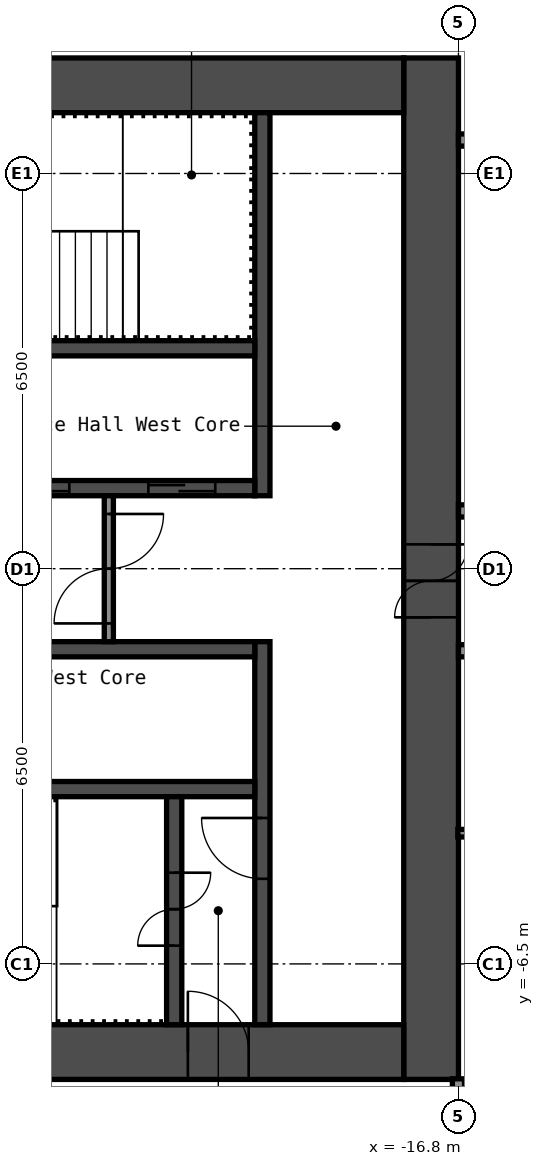
"""IFC4 building model, lengths in metres.
Left out: names, types, materials, properties, quantities, classifications, styles, units other than length and angle.
Written with IfcOpenShell. Run it as: python <this file> out.ifc"""

import sys

from ifc_helpers import new_model, si_unit, direction, frame, frame_2d, origin, place, context, subcontext, project, spatial, rectangle, extrude, element, fill, save


model = new_model("IFC4")
c1 = context("Model", 3, precision=1e-05, world=origin(), true_north=direction((0.0, 1.0)))
c2 = subcontext(c1, "Body", "Model", "MODEL_VIEW")
j1 = project(units=[si_unit("LENGTHUNIT", "METRE"), si_unit("PLANEANGLEUNIT", "RADIAN")], contexts=[c1])
p1 = place(None, origin())
s1 = spatial("IfcSite", under=j1, at=p1, CompositionType="ELEMENT")
p2 = place(p1, origin())
s2 = spatial("IfcBuilding", under=s1, at=p2, CompositionType="ELEMENT")
p3 = place(p2, frame((0.0, 0.0, 78.6)))
s3 = spatial("IfcBuildingStorey", under=s2, at=p3, CompositionType="ELEMENT", Elevation=78.6)
p4 = place(p3, frame((-17.25, -8.4, 0.0), z_axis=(0.0, 0.0, 1.0), x_axis=(0.0, 1.0, 0.0)))
e1 = element("IfcWall", 1, at=p4, inside=s3, PredefinedType="SHEAR", context=c2, shape_type="SweptSolid", body=[
    extrude(rectangle(XDim=16.8, YDim=0.9, at=frame_2d((8.4, 0.0))), origin(), (0.0, 0.0, 1.0), 2.8),
])
p5 = place(p4, frame((7.6, 0.0, 0.0)))
e2 = element("IfcOpeningElement", 2, at=p5, cuts=e1, PredefinedType="OPENING", context=c2, shape_type="SweptSolid", body=[
    extrude(rectangle(XDim=1.2, YDim=2.1, at=frame_2d((0.6, 1.05))), frame((0.0, 0.46, 0.0), z_axis=(0.0, -1.0, 0.0), x_axis=(1.0, 0.0, 0.0)), (0.0, 0.0, 1.0), 0.92),
])
p6 = place(p3, frame((-32.7, 7.95, 0.0), z_axis=(0.0, 0.0, 1.0), x_axis=(1.0, 0.0, 0.0)))
e3 = element("IfcWall", 3, at=p6, inside=s3, PredefinedType="SHEAR", context=c2, shape_type="SweptSolid", body=[
    extrude(rectangle(XDim=15.0, YDim=0.9, at=frame_2d((7.5, 0.0))), origin(), (0.0, 0.0, 1.0), 2.8),
])
p7 = place(p6, frame((3.4, 0.0, 0.0)))
e4 = element("IfcOpeningElement", 4, at=p7, cuts=e3, PredefinedType="OPENING", context=c2, shape_type="SweptSolid", body=[
    extrude(rectangle(XDim=1.2, YDim=2.1, at=frame_2d((0.6, 1.05))), frame((0.0, 0.46, 0.0), z_axis=(0.0, -1.0, 0.0), x_axis=(1.0, 0.0, 0.0)), (0.0, 0.0, 1.0), 0.92),
])
p8 = place(p6, frame((0.75, 0.0, 0.0)))
e5 = element("IfcOpeningElement", 5, at=p8, cuts=e3, PredefinedType="OPENING", context=c2, shape_type="SweptSolid", body=[
    extrude(rectangle(XDim=0.9, YDim=2.1, at=frame_2d((0.45, 1.05))), frame((0.0, 0.46, 0.0), z_axis=(0.0, -1.0, 0.0), x_axis=(1.0, 0.0, 0.0)), (0.0, 0.0, 1.0), 0.92),
])
p9 = place(p3, frame((-32.7, -7.95, 0.0), z_axis=(0.0, 0.0, 1.0), x_axis=(1.0, 0.0, 0.0)))
e6 = element("IfcWall", 6, at=p9, inside=s3, PredefinedType="SHEAR", context=c2, shape_type="SweptSolid", body=[
    extrude(rectangle(XDim=15.0, YDim=0.9, at=frame_2d((7.5, 0.0))), origin(), (0.0, 0.0, 1.0), 2.8),
])
p10 = place(p9, frame((11.45, 0.0, 0.0)))
e7 = element("IfcOpeningElement", 7, at=p10, cuts=e6, PredefinedType="OPENING", context=c2, shape_type="SweptSolid", body=[
    extrude(rectangle(XDim=1.0, YDim=2.1, at=frame_2d((0.5, 1.05))), frame((0.0, 0.46, 0.0), z_axis=(0.0, -1.0, 0.0), x_axis=(1.0, 0.0, 0.0)), (0.0, 0.0, 1.0), 0.92),
])
p11 = place(p3, frame((-20.025, 1.2, 0.0), z_axis=(0.0, 0.0, 1.0), x_axis=(0.0, 1.0, 0.0)))
e8 = element("IfcWall", 8, at=p11, inside=s3, PredefinedType="SHEAR", context=c2, shape_type="SweptSolid", body=[
    extrude(rectangle(XDim=6.3, YDim=0.25, at=frame_2d((3.15, 0.0))), origin(), (0.0, 0.0, 1.0), 2.8),
])
p12 = place(p3, frame((-20.025, -7.5, 0.0), z_axis=(0.0, 0.0, 1.0), x_axis=(0.0, 1.0, 0.0)))
e9 = element("IfcWall", 9, at=p12, inside=s3, PredefinedType="SHEAR", context=c2, shape_type="SweptSolid", body=[
    extrude(rectangle(XDim=6.3, YDim=0.25, at=frame_2d((3.15, 0.0))), origin(), (0.0, 0.0, 1.0), 2.8),
])
p13 = place(p12, frame((2.4, 0.0, 0.0)))
e10 = element("IfcOpeningElement", 10, at=p13, cuts=e9, PredefinedType="OPENING", context=c2, shape_type="SweptSolid", body=[
    extrude(rectangle(XDim=1.0, YDim=2.1, at=frame_2d((0.5, 1.05))), frame((0.0, 0.135, 0.0), z_axis=(0.0, -1.0, 0.0), x_axis=(1.0, 0.0, 0.0)), (0.0, 0.0, 1.0), 0.27),
])
p14 = place(p3, frame((-27.65, 1.325, 0.0), z_axis=(0.0, 0.0, 1.0), x_axis=(1.0, 0.0, 0.0)))
e11 = element("IfcWall", 11, at=p14, inside=s3, PredefinedType="SHEAR", context=c2, shape_type="SweptSolid", body=[
    extrude(rectangle(XDim=7.5, YDim=0.25, at=frame_2d((3.75, 0.0))), origin(), (0.0, 0.0, 1.0), 2.8),
])
p15 = place(p14, frame((5.75, 0.0, 0.0)))
e12 = element("IfcOpeningElement", 12, at=p15, cuts=e11, PredefinedType="OPENING", context=c2, shape_type="SweptSolid", body=[
    extrude(rectangle(XDim=1.1, YDim=2.1, at=frame_2d((0.55, 1.05))), frame((0.0, 0.135, 0.0), z_axis=(0.0, -1.0, 0.0), x_axis=(1.0, 0.0, 0.0)), (0.0, 0.0, 1.0), 0.27),
])
p16 = place(p14, frame((3.35, 0.0, 0.0)))
e13 = element("IfcOpeningElement", 13, at=p16, cuts=e11, PredefinedType="OPENING", context=c2, shape_type="SweptSolid", body=[
    extrude(rectangle(XDim=1.1, YDim=2.1, at=frame_2d((0.55, 1.05))), frame((0.0, 0.135, 0.0), z_axis=(0.0, -1.0, 0.0), x_axis=(1.0, 0.0, 0.0)), (0.0, 0.0, 1.0), 0.27),
])
p17 = place(p14, frame((0.95, 0.0, 0.0)))
e14 = element("IfcOpeningElement", 14, at=p17, cuts=e11, PredefinedType="OPENING", context=c2, shape_type="SweptSolid", body=[
    extrude(rectangle(XDim=1.1, YDim=2.1, at=frame_2d((0.55, 1.05))), frame((0.0, 0.135, 0.0), z_axis=(0.0, -1.0, 0.0), x_axis=(1.0, 0.0, 0.0)), (0.0, 0.0, 1.0), 0.27),
])
for number, where, z_axis, x_axis in (
    (15, (-27.65, 3.625, 0.0), (0.0, 0.0, 1.0), (1.0, 0.0, 0.0)),
    (16, (-27.65, -1.325, 0.0), (0.0, 0.0, 1.0), (1.0, 0.0, 0.0)),
    (17, (-27.65, -3.625, 0.0), (0.0, 0.0, 1.0), (1.0, 0.0, 0.0)),
):
    element("IfcWall", number, at=place(p3, frame(where, z_axis=z_axis, x_axis=x_axis)), inside=s3, PredefinedType="SHEAR", context=c2, shape_type="SweptSolid", body=[
        extrude(rectangle(XDim=7.5, YDim=0.25, at=frame_2d((3.75, 0.0))), origin(), (0.0, 0.0, 1.0), 2.8),
    ])
p18 = place(p3, frame((-21.475, -7.5, 0.0), z_axis=(0.0, 0.0, 1.0), x_axis=(0.0, 1.0, 0.0)))
e18 = element("IfcWall", 18, at=p18, inside=s3, PredefinedType="SHEAR", context=c2, shape_type="SweptSolid", body=[
    extrude(rectangle(XDim=3.75, YDim=0.25, at=frame_2d((1.875, 0.0))), origin(), (0.0, 0.0, 1.0), 2.8),
])
p19 = place(p18, frame((1.3, 0.0, 0.0)))
e19 = element("IfcOpeningElement", 19, at=p19, cuts=e18, PredefinedType="OPENING", context=c2, shape_type="SweptSolid", body=[
    extrude(rectangle(XDim=1.2, YDim=2.1, at=frame_2d((0.6, 1.05))), frame((0.0, 0.135, 0.0), z_axis=(0.0, -1.0, 0.0), x_axis=(1.0, 0.0, 0.0)), (0.0, 0.0, 1.0), 0.27),
])
p20 = place(p3, frame((-22.55, -1.2, 0.0), z_axis=(0.0, 0.0, 1.0), x_axis=(0.0, 1.0, 0.0)))
e20 = element("IfcWall", 20, at=p20, inside=s3, PredefinedType="PARTITIONING", context=c2, shape_type="SweptSolid", body=[
    extrude(rectangle(XDim=2.4, YDim=0.15, at=frame_2d((1.2, 0.0))), origin(), (0.0, 0.0, 1.0), 2.8),
])
p21 = place(p20, frame((0.3, 0.0, 0.0)))
e21 = element("IfcOpeningElement", 21, at=p21, cuts=e20, PredefinedType="OPENING", context=c2, shape_type="SweptSolid", body=[
    extrude(rectangle(XDim=1.8, YDim=2.1, at=frame_2d((0.9, 1.05))), frame((0.0, 0.085, 0.0), z_axis=(0.0, -1.0, 0.0), x_axis=(1.0, 0.0, 0.0)), (0.0, 0.0, 1.0), 0.17),
])
p22 = place(p3, frame((-16.81, -4.35, 0.0), z_axis=(0.0, 0.0, 1.0), x_axis=(1.0, 0.0, 0.0)))
e22 = element("IfcWall", 22, at=p22, inside=s3, PredefinedType="PARTITIONING", context=c2, shape_type="SweptSolid", body=[
    extrude(rectangle(XDim=2.448, YDim=0.125, at=frame_2d((1.224, 0.0))), origin(), (0.0, 0.0, 1.0), 2.8),
])
p23 = place(p3, frame((-16.8, -1.35, 0.0), z_axis=(0.0, 0.0, 1.0), x_axis=(1.0, 0.0, 0.0)))
e23 = element("IfcWall", 23, at=p23, inside=s3, PredefinedType="PARTITIONING", context=c2, shape_type="SweptSolid", body=[
    extrude(rectangle(XDim=33.6, YDim=0.2, at=frame_2d((16.8, 0.0))), origin(), (0.0, 0.0, 1.0), 2.8),
])
p24 = place(p23, frame((2.85, 0.0, 0.0)))
e24 = element("IfcOpeningElement", 24, at=p24, cuts=e23, PredefinedType="OPENING", context=c2, shape_type="SweptSolid", body=[
    extrude(rectangle(XDim=1.0, YDim=2.1, at=frame_2d((0.5, 1.05))), frame((0.0, 0.11, 0.0), z_axis=(0.0, -1.0, 0.0), x_axis=(1.0, 0.0, 0.0)), (0.0, 0.0, 1.0), 0.22),
])
p25 = place(p23, frame((4.55, 0.0, 0.0)))
e25 = element("IfcOpeningElement", 25, at=p25, cuts=e23, PredefinedType="OPENING", context=c2, shape_type="SweptSolid", body=[
    extrude(rectangle(XDim=1.0, YDim=2.1, at=frame_2d((0.5, 1.05))), frame((0.0, 0.11, 0.0), z_axis=(0.0, -1.0, 0.0), x_axis=(1.0, 0.0, 0.0)), (0.0, 0.0, 1.0), 0.22),
])
p26 = place(p23, frame((13.9, 0.0, 0.0)))
e26 = element("IfcOpeningElement", 26, at=p26, cuts=e23, PredefinedType="OPENING", context=c2, shape_type="SweptSolid", body=[
    extrude(rectangle(XDim=1.0, YDim=2.1, at=frame_2d((0.5, 1.05))), frame((0.0, 0.11, 0.0), z_axis=(0.0, -1.0, 0.0), x_axis=(1.0, 0.0, 0.0)), (0.0, 0.0, 1.0), 0.22),
])
p27 = place(p23, frame((20.5, 0.0, 0.0)))
e27 = element("IfcOpeningElement", 27, at=p27, cuts=e23, PredefinedType="OPENING", context=c2, shape_type="SweptSolid", body=[
    extrude(rectangle(XDim=1.0, YDim=2.1, at=frame_2d((0.5, 1.05))), frame((0.0, 0.11, 0.0), z_axis=(0.0, -1.0, 0.0), x_axis=(1.0, 0.0, 0.0)), (0.0, 0.0, 1.0), 0.22),
])
p28 = place(p23, frame((28.05, 0.0, 0.0)))
e28 = element("IfcOpeningElement", 28, at=p28, cuts=e23, PredefinedType="OPENING", context=c2, shape_type="SweptSolid", body=[
    extrude(rectangle(XDim=1.0, YDim=2.1, at=frame_2d((0.5, 1.05))), frame((0.0, 0.11, 0.0), z_axis=(0.0, -1.0, 0.0), x_axis=(1.0, 0.0, 0.0)), (0.0, 0.0, 1.0), 0.22),
])
p29 = place(p23, frame((29.75, 0.0, 0.0)))
e29 = element("IfcOpeningElement", 29, at=p29, cuts=e23, PredefinedType="OPENING", context=c2, shape_type="SweptSolid", body=[
    extrude(rectangle(XDim=1.0, YDim=2.1, at=frame_2d((0.5, 1.05))), frame((0.0, 0.11, 0.0), z_axis=(0.0, -1.0, 0.0), x_axis=(1.0, 0.0, 0.0)), (0.0, 0.0, 1.0), 0.22),
])
p30 = place(p3, frame((-16.8, 0.95, 0.0), z_axis=(0.0, 0.0, 1.0), x_axis=(1.0, 0.0, 0.0)))
e30 = element("IfcWall", 30, at=p30, inside=s3, PredefinedType="PARTITIONING", context=c2, shape_type="SweptSolid", body=[
    extrude(rectangle(XDim=33.6, YDim=0.2, at=frame_2d((16.8, 0.0))), origin(), (0.0, 0.0, 1.0), 2.8),
])
p31 = place(p30, frame((9.88, 0.0, 0.0)))
e31 = element("IfcOpeningElement", 31, at=p31, cuts=e30, PredefinedType="OPENING", context=c2, shape_type="SweptSolid", body=[
    extrude(rectangle(XDim=0.9, YDim=2.1, at=frame_2d((0.45, 1.05))), frame((0.0, 0.11, 0.0), z_axis=(0.0, -1.0, 0.0), x_axis=(1.0, 0.0, 0.0)), (0.0, 0.0, 1.0), 0.22),
])
p32 = place(p30, frame((14.08, 0.0, 0.0)))
e32 = element("IfcOpeningElement", 32, at=p32, cuts=e30, PredefinedType="OPENING", context=c2, shape_type="SweptSolid", body=[
    extrude(rectangle(XDim=0.9, YDim=2.1, at=frame_2d((0.45, 1.05))), frame((0.0, 0.11, 0.0), z_axis=(0.0, -1.0, 0.0), x_axis=(1.0, 0.0, 0.0)), (0.0, 0.0, 1.0), 0.22),
])
p33 = place(p30, frame((26.26, 0.0, 0.0)))
e33 = element("IfcOpeningElement", 33, at=p33, cuts=e30, PredefinedType="OPENING", context=c2, shape_type="SweptSolid", body=[
    extrude(rectangle(XDim=0.9, YDim=2.1, at=frame_2d((0.45, 1.05))), frame((0.0, 0.11, 0.0), z_axis=(0.0, -1.0, 0.0), x_axis=(1.0, 0.0, 0.0)), (0.0, 0.0, 1.0), 0.22),
])
p34 = place(p30, frame((30.46, 0.0, 0.0)))
e34 = element("IfcOpeningElement", 34, at=p34, cuts=e30, PredefinedType="OPENING", context=c2, shape_type="SweptSolid", body=[
    extrude(rectangle(XDim=0.9, YDim=2.1, at=frame_2d((0.45, 1.05))), frame((0.0, 0.11, 0.0), z_axis=(0.0, -1.0, 0.0), x_axis=(1.0, 0.0, 0.0)), (0.0, 0.0, 1.0), 0.22),
])
p35 = place(p3, frame((-16.8, 7.05, 0.0), z_axis=(0.0, 0.0, 1.0), x_axis=(1.0, 0.0, 0.0)))
e35 = element("IfcWall", 35, at=p35, inside=s3, PredefinedType="PARTITIONING", context=c2, shape_type="SweptSolid", body=[
    extrude(rectangle(XDim=33.6, YDim=0.2, at=frame_2d((16.8, 0.0))), origin(), (0.0, 0.0, 1.0), 2.8),
])
p36 = place(p35, frame((1.4, 0.0, 0.0)))
e36 = element("IfcOpeningElement", 36, at=p36, cuts=e35, PredefinedType="OPENING", context=c2, shape_type="SweptSolid", body=[
    extrude(rectangle(XDim=0.9, YDim=2.1, at=frame_2d((0.45, 1.05))), frame((0.0, 0.11, 0.0), z_axis=(0.0, -1.0, 0.0), x_axis=(1.0, 0.0, 0.0)), (0.0, 0.0, 1.0), 0.22),
])
p37 = place(p35, frame((5.6, 0.0, 0.0)))
e37 = element("IfcOpeningElement", 37, at=p37, cuts=e35, PredefinedType="OPENING", context=c2, shape_type="SweptSolid", body=[
    extrude(rectangle(XDim=0.9, YDim=2.1, at=frame_2d((0.45, 1.05))), frame((0.0, 0.11, 0.0), z_axis=(0.0, -1.0, 0.0), x_axis=(1.0, 0.0, 0.0)), (0.0, 0.0, 1.0), 0.22),
])
p38 = place(p35, frame((19.04, 0.0, 0.0)))
e38 = element("IfcOpeningElement", 38, at=p38, cuts=e35, PredefinedType="OPENING", context=c2, shape_type="SweptSolid", body=[
    extrude(rectangle(XDim=0.9, YDim=2.1, at=frame_2d((0.45, 1.05))), frame((0.0, 0.11, 0.0), z_axis=(0.0, -1.0, 0.0), x_axis=(1.0, 0.0, 0.0)), (0.0, 0.0, 1.0), 0.22),
])
p39 = place(p35, frame((23.24, 0.0, 0.0)))
e39 = element("IfcOpeningElement", 39, at=p39, cuts=e35, PredefinedType="OPENING", context=c2, shape_type="SweptSolid", body=[
    extrude(rectangle(XDim=0.9, YDim=2.1, at=frame_2d((0.45, 1.05))), frame((0.0, 0.11, 0.0), z_axis=(0.0, -1.0, 0.0), x_axis=(1.0, 0.0, 0.0)), (0.0, 0.0, 1.0), 0.22),
])
p40 = place(p3, frame((-16.8, -15.55, 0.0), z_axis=(0.0, 0.0, 1.0), x_axis=(0.0, 1.0, 0.0)))
e40 = element("IfcWall", 40, at=p40, inside=s3, PredefinedType="PARTITIONING", context=c2, shape_type="SweptSolid", body=[
    extrude(rectangle(XDim=7.16, YDim=0.2, at=frame_2d((3.58, 0.0))), origin(), (0.0, 0.0, 1.0), 2.8),
])
p41 = place(p5, origin())
e41 = element("IfcDoor", 41, at=p41, inside=s3, OperationType="DOUBLE_DOOR_SINGLE_SWING", PredefinedType="DOOR", context=c2, shape_type="SweptSolid", body=[
    extrude(rectangle(XDim=1.2, YDim=2.1, at=frame_2d((0.6, 1.05))), frame((0.0, 0.025, 0.0), z_axis=(0.0, -1.0, 0.0), x_axis=(1.0, 0.0, 0.0)), (0.0, 0.0, 1.0), 0.05),
])
fill(e2, e41)
p42 = place(p10, origin())
e42 = element("IfcDoor", 42, at=p42, inside=s3, OperationType="SINGLE_SWING_RIGHT", PredefinedType="DOOR", context=c2, shape_type="SweptSolid", body=[
    extrude(rectangle(XDim=1.0, YDim=2.1, at=frame_2d((0.5, 1.05))), frame((0.0, 0.025, 0.0), z_axis=(0.0, -1.0, 0.0), x_axis=(1.0, 0.0, 0.0)), (0.0, 0.0, 1.0), 0.05),
])
fill(e7, e42)
p43 = place(p19, origin())
e43 = element("IfcDoor", 43, at=p43, inside=s3, OperationType="DOUBLE_DOOR_SINGLE_SWING", PredefinedType="DOOR", context=c2, shape_type="SweptSolid", body=[
    extrude(rectangle(XDim=1.2, YDim=2.1, at=frame_2d((0.6, 1.05))), frame((0.0, 0.025, 0.0), z_axis=(0.0, -1.0, 0.0), x_axis=(1.0, 0.0, 0.0)), (0.0, 0.0, 1.0), 0.05),
])
fill(e19, e43)
p44 = place(p13, origin())
e44 = element("IfcDoor", 44, at=p44, inside=s3, OperationType="SINGLE_SWING_LEFT", PredefinedType="DOOR", context=c2, shape_type="SweptSolid", body=[
    extrude(rectangle(XDim=1.0, YDim=2.1, at=frame_2d((0.5, 1.05))), frame((0.0, 0.025, 0.0), z_axis=(0.0, -1.0, 0.0), x_axis=(1.0, 0.0, 0.0)), (0.0, 0.0, 1.0), 0.05),
])
fill(e10, e44)
p45 = place(p21, origin())
e45 = element("IfcDoor", 45, at=p45, inside=s3, OperationType="DOUBLE_DOOR_SINGLE_SWING", PredefinedType="DOOR", context=c2, shape_type="SweptSolid", body=[
    extrude(rectangle(XDim=1.8, YDim=2.1, at=frame_2d((0.9, 1.05))), frame((0.0, 0.025, 0.0), z_axis=(0.0, -1.0, 0.0), x_axis=(1.0, 0.0, 0.0)), (0.0, 0.0, 1.0), 0.05),
])
fill(e21, e45)
p46 = place(p15, origin())
e46 = element("IfcDoor", 46, at=p46, inside=s3, OperationType="DOUBLE_DOOR_SLIDING", PredefinedType="DOOR", context=c2, shape_type="SweptSolid", body=[
    extrude(rectangle(XDim=1.1, YDim=2.1, at=frame_2d((0.55, 1.05))), frame((0.0, 0.025, 0.0), z_axis=(0.0, -1.0, 0.0), x_axis=(1.0, 0.0, 0.0)), (0.0, 0.0, 1.0), 0.05),
])
fill(e12, e46)
p47 = place(p16, origin())
e47 = element("IfcDoor", 47, at=p47, inside=s3, OperationType="DOUBLE_DOOR_SLIDING", PredefinedType="DOOR", context=c2, shape_type="SweptSolid", body=[
    extrude(rectangle(XDim=1.1, YDim=2.1, at=frame_2d((0.55, 1.05))), frame((0.0, 0.025, 0.0), z_axis=(0.0, -1.0, 0.0), x_axis=(1.0, 0.0, 0.0)), (0.0, 0.0, 1.0), 0.05),
])
fill(e13, e47)
save(model, sys.argv[1])
